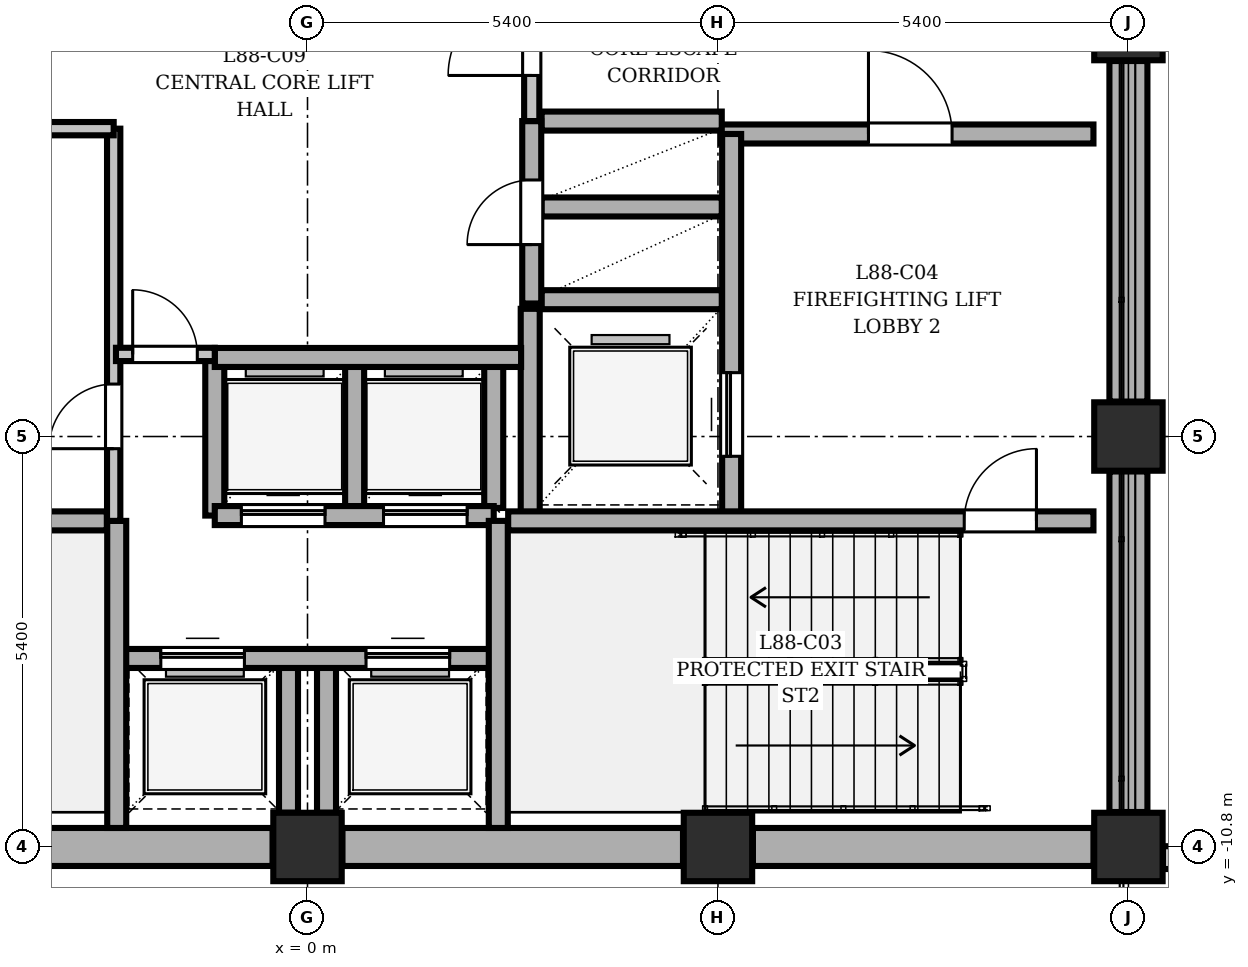
"""IFC4 building model, lengths in metres.
Left out: names, types, materials, properties, quantities, classifications, styles, units other than length and angle.
Written with IfcOpenShell. Run it as: python <this file> out.ifc"""

import sys

from ifc_helpers import new_model, si_unit, direction, frame, frame_2d, origin, origin_2d, place, context, subcontext, project, spatial, rectangle, extrude, element, fill, save


model = new_model("IFC4")
c1 = context("Model", 3, precision=1e-05, world=origin(), true_north=direction((0.0, 1.0)))
c2 = subcontext(c1, "Body", "Model", "MODEL_VIEW")
j1 = project(units=[si_unit("LENGTHUNIT", "METRE"), si_unit("PLANEANGLEUNIT", "RADIAN")], contexts=[c1])
p1 = place(None, origin())
s1 = spatial("IfcSite", under=j1, at=p1, CompositionType="ELEMENT")
p2 = place(p1, origin())
s2 = spatial("IfcBuilding", under=s1, at=p2, CompositionType="ELEMENT")
p3 = place(p2, frame((0.0, 0.0, 337.5)))
s3 = spatial("IfcBuildingStorey", under=s2, at=p3, CompositionType="ELEMENT", Elevation=337.5)
for number, where, z_axis, x_axis in (
    (1, (0.0, -10.8, 0.0), (0.0, 0.0, 1.0), (1.0, 0.0, 0.0)),
    (2, (5.4, -10.8, 0.0), (0.0, 0.0, 1.0), (1.0, 0.0, 0.0)),
    (3, (10.8, -10.8, 0.0), (0.0, 0.0, 1.0), (1.0, 0.0, 0.0)),
    (4, (10.8, -5.4, 0.0), (0.0, 0.0, 1.0), (1.0, 0.0, 0.0)),
    (5, (10.8, 0.0, 0.0), (0.0, 0.0, 1.0), (1.0, 0.0, 0.0)),
):
    element("IfcColumn", number, at=place(p3, frame(where, z_axis=z_axis, x_axis=x_axis)), inside=s3, PredefinedType="COLUMN", context=c2, shape_type="SweptSolid", body=[
        extrude(rectangle(XDim=0.9, YDim=0.9, at=origin_2d()), origin(), (0.0, 0.0, 1.0), 4.5),
    ])
for number, where, z_axis, x_axis in (
    (6, (10.8, -10.34, 0.0), (0.0, 0.0, 1.0), (0.0, 1.0, 0.0)),
    (7, (-4.94, -10.8, 0.0), (0.0, 0.0, 1.0), (1.0, 0.0, 0.0)),
    (8, (10.8, -4.94, 0.0), (0.0, 0.0, 1.0), (0.0, 1.0, 0.0)),
    (9, (0.46, -10.8, 0.0), (0.0, 0.0, 1.0), (1.0, 0.0, 0.0)),
    (10, (5.86, -10.8, 0.0), (0.0, 0.0, 1.0), (1.0, 0.0, 0.0)),
):
    element("IfcWall", number, at=place(p3, frame(where, z_axis=z_axis, x_axis=x_axis)), inside=s3, PredefinedType="SHEAR", context=c2, shape_type="SweptSolid", body=[
        extrude(rectangle(XDim=4.48, YDim=0.5, at=frame_2d((2.24, 0.0))), origin(), (0.0, 0.0, 1.0), 4.5),
    ])
p4 = place(p3, frame((11.254, -10.94, 0.0), z_axis=(0.0, 0.0, 1.0), x_axis=(1.0, 0.0, 0.0)))
e11 = element("IfcWall", 11, at=p4, inside=s3, PredefinedType="STANDARD", context=c2, shape_type="SweptSolid", body=[
    extrude(rectangle(XDim=3.706, YDim=0.3, at=frame_2d((1.853, 0.0))), origin(), (0.0, 0.0, 1.0), 3.507),
])
p5 = place(p4, frame((1.328, 0.0, 0.75)))
e12 = element("IfcOpeningElement", 12, at=p5, cuts=e11, PredefinedType="OPENING", context=c2, shape_type="SweptSolid", body=[
    extrude(rectangle(XDim=1.05, YDim=1.5, at=frame_2d((0.525, 0.75))), frame((0.0, 0.16, 0.0), z_axis=(0.0, -1.0, 0.0), x_axis=(1.0, 0.0, 0.0)), (0.0, 0.0, 1.0), 0.32),
])
p6 = place(p3, frame((2.93, -6.51, 0.0), z_axis=(0.0, 0.0, 1.0), x_axis=(0.0, 1.0, 0.0)))
e13 = element("IfcWall", 13, at=p6, inside=s3, PredefinedType="SHEAR", context=c2, shape_type="SweptSolid", body=[
    extrude(rectangle(XDim=2.79, YDim=0.25, at=frame_2d((1.395, 0.0))), origin(), (0.0, 0.0, 1.0), 4.5),
])
p7 = place(p3, frame((5.44, -1.42, 0.0), z_axis=(0.0, 0.0, 1.0), x_axis=(1.0, 0.0, 0.0)))
e14 = element("IfcWall", 14, at=p7, inside=s3, PredefinedType="SHEAR", context=c2, shape_type="SweptSolid", body=[
    extrude(rectangle(XDim=4.9, YDim=0.25, at=frame_2d((2.45, 0.0))), origin(), (0.0, 0.0, 1.0), 4.5),
])
p8 = place(p7, frame((1.94, 0.0, 0.0)))
e15 = element("IfcOpeningElement", 15, at=p8, cuts=e14, PredefinedType="OPENING", context=c2, shape_type="SweptSolid", body=[
    extrude(rectangle(XDim=1.1, YDim=2.1, at=frame_2d((0.55, 1.05))), frame((0.0, 0.135, 0.0), z_axis=(0.0, -1.0, 0.0), x_axis=(1.0, 0.0, 0.0)), (0.0, 0.0, 1.0), 0.27),
])
p9 = place(p3, frame((3.08, -3.6, 0.0), z_axis=(0.0, 0.0, 1.0), x_axis=(1.0, 0.0, 0.0)))
e16 = element("IfcWall", 16, at=p9, inside=s3, PredefinedType="SHEAR", context=c2, shape_type="SweptSolid", body=[
    extrude(rectangle(XDim=2.37, YDim=0.25, at=frame_2d((1.185, 0.0))), origin(), (0.0, 0.0, 1.0), 4.5),
])
p10 = place(p3, frame((5.58, -6.51, 0.0), z_axis=(0.0, 0.0, 1.0), x_axis=(0.0, 1.0, 0.0)))
e17 = element("IfcWall", 17, at=p10, inside=s3, PredefinedType="SHEAR", context=c2, shape_type="SweptSolid", body=[
    extrude(rectangle(XDim=5.09, YDim=0.25, at=frame_2d((2.545, 0.0))), origin(), (0.0, 0.0, 1.0), 4.5),
])
p11 = place(p10, frame((0.85, 0.0, 0.0)))
e18 = element("IfcOpeningElement", 18, at=p11, cuts=e17, PredefinedType="OPENING", context=c2, shape_type="SweptSolid", body=[
    extrude(rectangle(XDim=1.1, YDim=2.1, at=frame_2d((0.55, 1.05))), frame((0.0, 0.135, 0.0), z_axis=(0.0, -1.0, 0.0), x_axis=(1.0, 0.0, 0.0)), (0.0, 0.0, 1.0), 0.27),
])
for number, where, z_axis, x_axis in (
    (19, (0.62, -6.34, 0.0), (0.0, 0.0, 1.0), (0.0, 1.0, 0.0)),
    (20, (2.45, -6.34, 0.0), (0.0, 0.0, 1.0), (0.0, 1.0, 0.0)),
):
    element("IfcWall", number, at=place(p3, frame(where, z_axis=z_axis, x_axis=x_axis)), inside=s3, PredefinedType="SHEAR", context=c2, shape_type="SweptSolid", body=[
        extrude(rectangle(XDim=1.88, YDim=0.25, at=frame_2d((0.94, 0.0))), origin(), (0.0, 0.0, 1.0), 4.5),
    ])
for number, where, z_axis, x_axis in (
    (21, (-0.25, -10.35, 0.0), (0.0, 0.0, 1.0), (0.0, 1.0, 0.0)),
    (22, (0.25, -10.35, 0.0), (0.0, 0.0, 1.0), (0.0, 1.0, 0.0)),
):
    element("IfcWall", number, at=place(p3, frame(where, z_axis=z_axis, x_axis=x_axis)), inside=s3, PredefinedType="SHEAR", context=c2, shape_type="SweptSolid", body=[
        extrude(rectangle(XDim=1.91, YDim=0.25, at=frame_2d((0.955, 0.0))), origin(), (0.0, 0.0, 1.0), 4.5),
    ])
p12 = place(p3, frame((-1.22, -6.44, 0.0), z_axis=(0.0, 0.0, 1.0), x_axis=(0.0, 1.0, 0.0)))
e23 = element("IfcWall", 23, at=p12, inside=s3, PredefinedType="SHEAR", context=c2, shape_type="SweptSolid", body=[
    extrude(rectangle(XDim=2.08, YDim=0.25, at=frame_2d((1.04, 0.0))), origin(), (0.0, 0.0, 1.0), 4.5),
])
p13 = place(p3, frame((-1.22, -6.44, 0.0), z_axis=(0.0, 0.0, 1.0), x_axis=(1.0, 0.0, 0.0)))
e24 = element("IfcWall", 24, at=p13, inside=s3, PredefinedType="SHEAR", context=c2, shape_type="SweptSolid", body=[
    extrude(rectangle(XDim=3.67, YDim=0.25, at=frame_2d((1.835, 0.0))), origin(), (0.0, 0.0, 1.0), 4.5),
])
p14 = place(p13, frame((0.35, 0.0, 0.0)))
e25 = element("IfcOpeningElement", 25, at=p14, cuts=e24, PredefinedType="OPENING", context=c2, shape_type="SweptSolid", body=[
    extrude(rectangle(XDim=1.1, YDim=2.1, at=frame_2d((0.55, 1.05))), frame((0.0, 0.135, 0.0), z_axis=(0.0, -1.0, 0.0), x_axis=(1.0, 0.0, 0.0)), (0.0, 0.0, 1.0), 0.27),
])
p15 = place(p13, frame((2.22, 0.0, 0.0)))
e26 = element("IfcOpeningElement", 26, at=p15, cuts=e24, PredefinedType="OPENING", context=c2, shape_type="SweptSolid", body=[
    extrude(rectangle(XDim=1.1, YDim=2.1, at=frame_2d((0.55, 1.05))), frame((0.0, 0.135, 0.0), z_axis=(0.0, -1.0, 0.0), x_axis=(1.0, 0.0, 0.0)), (0.0, 0.0, 1.0), 0.27),
])
p16 = place(p3, frame((-2.48, -8.32, 0.0), z_axis=(0.0, 0.0, 1.0), x_axis=(1.0, 0.0, 0.0)))
e27 = element("IfcWall", 27, at=p16, inside=s3, PredefinedType="SHEAR", context=c2, shape_type="SweptSolid", body=[
    extrude(rectangle(XDim=4.93, YDim=0.25, at=frame_2d((2.465, 0.0))), origin(), (0.0, 0.0, 1.0), 4.5),
])
p17 = place(p16, frame((0.55, 0.0, 0.0)))
e28 = element("IfcOpeningElement", 28, at=p17, cuts=e27, PredefinedType="OPENING", context=c2, shape_type="SweptSolid", body=[
    extrude(rectangle(XDim=1.1, YDim=2.1, at=frame_2d((0.55, 1.05))), frame((0.0, 0.135, 0.0), z_axis=(0.0, -1.0, 0.0), x_axis=(1.0, 0.0, 0.0)), (0.0, 0.0, 1.0), 0.27),
])
p18 = place(p16, frame((3.25, 0.0, 0.0)))
e29 = element("IfcOpeningElement", 29, at=p18, cuts=e27, PredefinedType="OPENING", context=c2, shape_type="SweptSolid", body=[
    extrude(rectangle(XDim=1.1, YDim=2.1, at=frame_2d((0.55, 1.05))), frame((0.0, 0.135, 0.0), z_axis=(0.0, -1.0, 0.0), x_axis=(1.0, 0.0, 0.0)), (0.0, 0.0, 1.0), 0.27),
])
p19 = place(p3, frame((-1.22, -4.36, 0.0), z_axis=(0.0, 0.0, 1.0), x_axis=(1.0, 0.0, 0.0)))
e30 = element("IfcWall", 30, at=p19, inside=s3, PredefinedType="SHEAR", context=c2, shape_type="SweptSolid", body=[
    extrude(rectangle(XDim=4.03, YDim=0.25, at=frame_2d((2.015, 0.0))), origin(), (0.0, 0.0, 1.0), 4.5),
])
for number, where, z_axis, x_axis in (
    (31, (3.08, -2.38, 0.0), (0.0, 0.0, 1.0), (1.0, 0.0, 0.0)),
    (32, (3.08, -1.25, 0.0), (0.0, 0.0, 1.0), (1.0, 0.0, 0.0)),
):
    element("IfcWall", number, at=place(p3, frame(where, z_axis=z_axis, x_axis=x_axis)), inside=s3, PredefinedType="SHEAR", context=c2, shape_type="SweptSolid", body=[
        extrude(rectangle(XDim=2.37, YDim=0.25, at=frame_2d((1.185, 0.0))), origin(), (0.0, 0.0, 1.0), 4.5),
    ])
p20 = place(p3, frame((2.95, -3.65, 0.0), z_axis=(0.0, 0.0, 1.0), x_axis=(0.0, 1.0, 0.0)))
e33 = element("IfcWall", 33, at=p20, inside=s3, PredefinedType="SHEAR", context=c2, shape_type="SweptSolid", body=[
    extrude(rectangle(XDim=2.4, YDim=0.25, at=frame_2d((1.2, 0.0))), origin(), (0.0, 0.0, 1.0), 4.5),
])
p21 = place(p20, frame((0.775, 0.0, 0.0)))
e34 = element("IfcOpeningElement", 34, at=p21, cuts=e33, PredefinedType="OPENING", context=c2, shape_type="SweptSolid", body=[
    extrude(rectangle(XDim=0.85, YDim=2.1, at=frame_2d((0.425, 1.05))), frame((0.0, 0.135, 0.0), z_axis=(0.0, -1.0, 0.0), x_axis=(1.0, 0.0, 0.0)), (0.0, 0.0, 1.0), 0.27),
])
p22 = place(p3, frame((2.64, -6.51, 0.0), z_axis=(0.0, 0.0, 1.0), x_axis=(1.0, 0.0, 0.0)))
e35 = element("IfcWall", 35, at=p22, inside=s3, PredefinedType="SHEAR", context=c2, shape_type="SweptSolid", body=[
    extrude(rectangle(XDim=7.7, YDim=0.25, at=frame_2d((3.85, 0.0))), origin(), (0.0, 0.0, 1.0), 4.5),
])
p23 = place(p22, frame((6.0, 0.0, 0.0)))
e36 = element("IfcOpeningElement", 36, at=p23, cuts=e35, PredefinedType="OPENING", context=c2, shape_type="SweptSolid", body=[
    extrude(rectangle(XDim=0.95, YDim=2.1, at=frame_2d((0.475, 1.05))), frame((0.0, 0.135, 0.0), z_axis=(0.0, -1.0, 0.0), x_axis=(1.0, 0.0, 0.0)), (0.0, 0.0, 1.0), 0.27),
])
for number, where, z_axis, x_axis in (
    (37, (2.51, -10.55, 0.0), (0.0, 0.0, 1.0), (0.0, 1.0, 0.0)),
    (38, (-2.51, -10.55, 0.0), (0.0, 0.0, 1.0), (0.0, 1.0, 0.0)),
):
    element("IfcWall", number, at=place(p3, frame(where, z_axis=z_axis, x_axis=x_axis)), inside=s3, PredefinedType="SHEAR", context=c2, shape_type="SweptSolid", body=[
        extrude(rectangle(XDim=4.04, YDim=0.25, at=frame_2d((2.02, 0.0))), origin(), (0.0, 0.0, 1.0), 4.5),
    ])
p24 = place(p3, frame((-10.34, -6.51, 0.0), z_axis=(0.0, 0.0, 1.0), x_axis=(1.0, 0.0, 0.0)))
e39 = element("IfcWall", 39, at=p24, inside=s3, PredefinedType="SHEAR", context=c2, shape_type="SweptSolid", body=[
    extrude(rectangle(XDim=7.7, YDim=0.25, at=frame_2d((3.85, 0.0))), origin(), (0.0, 0.0, 1.0), 4.5),
])
p25 = place(p24, frame((0.35, 0.0, 0.0)))
e40 = element("IfcOpeningElement", 40, at=p25, cuts=e39, PredefinedType="OPENING", context=c2, shape_type="SweptSolid", body=[
    extrude(rectangle(XDim=1.1, YDim=2.1, at=frame_2d((0.55, 1.05))), frame((0.0, 0.135, 0.0), z_axis=(0.0, -1.0, 0.0), x_axis=(1.0, 0.0, 0.0)), (0.0, 0.0, 1.0), 0.27),
])
p26 = place(p3, frame((-2.55, -6.51, 0.0), z_axis=(0.0, 0.0, 1.0), x_axis=(0.0, 1.0, 0.0)))
e41 = element("IfcWall", 41, at=p26, inside=s3, PredefinedType="PARTITIONING", context=c2, shape_type="SweptSolid", body=[
    extrude(rectangle(XDim=5.16, YDim=0.175, at=frame_2d((2.58, 0.0))), origin(), (0.0, 0.0, 1.0), 4.22),
])
p27 = place(p26, frame((0.95, 0.0, 0.0)))
e42 = element("IfcOpeningElement", 42, at=p27, cuts=e41, PredefinedType="OPENING", context=c2, shape_type="SweptSolid", body=[
    extrude(rectangle(XDim=0.85, YDim=2.1, at=frame_2d((0.425, 1.05))), frame((0.0, 0.097, 0.0), z_axis=(0.0, -1.0, 0.0), x_axis=(1.0, 0.0, 0.0)), (0.0, 0.0, 1.0), 0.195),
])
p28 = place(p3, frame((-7.18, -1.35, 0.0), z_axis=(0.0, 0.0, 1.0), x_axis=(1.0, 0.0, 0.0)))
e43 = element("IfcWall", 43, at=p28, inside=s3, PredefinedType="PARTITIONING", context=c2, shape_type="SweptSolid", body=[
    extrude(rectangle(XDim=4.63, YDim=0.175, at=frame_2d((2.315, 0.0))), origin(), (0.0, 0.0, 1.0), 4.22),
])
p29 = place(p3, frame((-2.52, -4.32, 0.0), z_axis=(0.0, 0.0, 1.0), x_axis=(1.0, 0.0, 0.0)))
e44 = element("IfcWall", 44, at=p29, inside=s3, PredefinedType="PARTITIONING", context=c2, shape_type="SweptSolid", body=[
    extrude(rectangle(XDim=1.3, YDim=0.175, at=frame_2d((0.65, 0.0))), origin(), (0.0, 0.0, 1.0), 4.22),
])
p30 = place(p29, frame((0.22, 0.0, 0.0)))
e45 = element("IfcOpeningElement", 45, at=p30, cuts=e44, PredefinedType="OPENING", context=c2, shape_type="SweptSolid", body=[
    extrude(rectangle(XDim=0.85, YDim=2.1, at=frame_2d((0.425, 1.05))), frame((0.0, 0.097, 0.0), z_axis=(0.0, -1.0, 0.0), x_axis=(1.0, 0.0, 0.0)), (0.0, 0.0, 1.0), 0.195),
])
p31 = place(p3, frame((2.95, -1.25, 0.0), z_axis=(0.0, 0.0, 1.0), x_axis=(0.0, 1.0, 0.0)))
e46 = element("IfcWall", 46, at=p31, inside=s3, PredefinedType="PARTITIONING", context=c2, shape_type="SweptSolid", body=[
    extrude(rectangle(XDim=2.77, YDim=0.2, at=frame_2d((1.385, 0.0))), origin(), (0.0, 0.0, 1.0), 4.22),
])
p32 = place(p31, frame((0.6, 0.0, 0.0)))
e47 = element("IfcOpeningElement", 47, at=p32, cuts=e46, PredefinedType="OPENING", context=c2, shape_type="SweptSolid", body=[
    extrude(rectangle(XDim=1.1, YDim=2.1, at=frame_2d((0.55, 1.05))), frame((0.0, 0.11, 0.0), z_axis=(0.0, -1.0, 0.0), x_axis=(1.0, 0.0, 0.0)), (0.0, 0.0, 1.0), 0.22),
])
p33 = place(p23, origin())
e48 = element("IfcDoor", 48, at=p33, inside=s3, OperationType="SINGLE_SWING_RIGHT", PredefinedType="DOOR", context=c2, shape_type="SweptSolid", body=[
    extrude(rectangle(XDim=0.95, YDim=2.1, at=frame_2d((0.475, 1.05))), frame((0.0, 0.025, 0.0), z_axis=(0.0, -1.0, 0.0), x_axis=(1.0, 0.0, 0.0)), (0.0, 0.0, 1.0), 0.05),
])
fill(e36, e48)
p34 = place(p21, origin())
e49 = element("IfcDoor", 49, at=p34, inside=s3, OperationType="SINGLE_SWING_LEFT", PredefinedType="DOOR", context=c2, shape_type="SweptSolid", body=[
    extrude(rectangle(XDim=0.85, YDim=2.1, at=frame_2d((0.425, 1.05))), frame((0.0, 0.025, 0.0), z_axis=(0.0, -1.0, 0.0), x_axis=(1.0, 0.0, 0.0)), (0.0, 0.0, 1.0), 0.05),
])
fill(e34, e49)
p35 = place(p8, origin())
e50 = element("IfcDoor", 50, at=p35, inside=s3, OperationType="SINGLE_SWING_LEFT", PredefinedType="DOOR", context=c2, shape_type="SweptSolid", body=[
    extrude(rectangle(XDim=1.1, YDim=2.1, at=frame_2d((0.55, 1.05))), frame((0.0, 0.025, 0.0), z_axis=(0.0, -1.0, 0.0), x_axis=(1.0, 0.0, 0.0)), (0.0, 0.0, 1.0), 0.05),
])
fill(e15, e50)
p36 = place(p11, origin())
e51 = element("IfcDoor", 51, at=p36, inside=s3, OperationType="SLIDING_TO_RIGHT", PredefinedType="DOOR", context=c2, shape_type="SweptSolid", body=[
    extrude(rectangle(XDim=1.1, YDim=2.1, at=frame_2d((0.55, 1.05))), frame((0.0, 0.025, 0.0), z_axis=(0.0, -1.0, 0.0), x_axis=(1.0, 0.0, 0.0)), (0.0, 0.0, 1.0), 0.05),
])
fill(e18, e51)
p37 = place(p32, origin())
e52 = element("IfcDoor", 52, at=p37, inside=s3, OperationType="SINGLE_SWING_LEFT", PredefinedType="DOOR", context=c2, shape_type="SweptSolid", body=[
    extrude(rectangle(XDim=1.1, YDim=2.1, at=frame_2d((0.55, 1.05))), frame((0.0, 0.025, 0.0), z_axis=(0.0, -1.0, 0.0), x_axis=(1.0, 0.0, 0.0)), (0.0, 0.0, 1.0), 0.05),
])
fill(e47, e52)
p38 = place(p30, origin())
e53 = element("IfcDoor", 53, at=p38, inside=s3, OperationType="SINGLE_SWING_LEFT", PredefinedType="DOOR", context=c2, shape_type="SweptSolid", body=[
    extrude(rectangle(XDim=0.85, YDim=2.1, at=frame_2d((0.425, 1.05))), frame((0.0, 0.025, 0.0), z_axis=(0.0, -1.0, 0.0), x_axis=(1.0, 0.0, 0.0)), (0.0, 0.0, 1.0), 0.05),
])
fill(e45, e53)
p39 = place(p14, origin())
e54 = element("IfcDoor", 54, at=p39, inside=s3, OperationType="SLIDING_TO_LEFT", PredefinedType="DOOR", context=c2, shape_type="SweptSolid", body=[
    extrude(rectangle(XDim=1.1, YDim=2.1, at=frame_2d((0.55, 1.05))), frame((0.0, 0.025, 0.0), z_axis=(0.0, -1.0, 0.0), x_axis=(1.0, 0.0, 0.0)), (0.0, 0.0, 1.0), 0.05),
])
fill(e25, e54)
p40 = place(p15, origin())
e55 = element("IfcDoor", 55, at=p40, inside=s3, OperationType="SLIDING_TO_LEFT", PredefinedType="DOOR", context=c2, shape_type="SweptSolid", body=[
    extrude(rectangle(XDim=1.1, YDim=2.1, at=frame_2d((0.55, 1.05))), frame((0.0, 0.025, 0.0), z_axis=(0.0, -1.0, 0.0), x_axis=(1.0, 0.0, 0.0)), (0.0, 0.0, 1.0), 0.05),
])
fill(e26, e55)
p41 = place(p17, origin())
e56 = element("IfcDoor", 56, at=p41, inside=s3, OperationType="SLIDING_TO_LEFT", PredefinedType="DOOR", context=c2, shape_type="SweptSolid", body=[
    extrude(rectangle(XDim=1.1, YDim=2.1, at=frame_2d((0.55, 1.05))), frame((0.0, 0.025, 0.0), z_axis=(0.0, -1.0, 0.0), x_axis=(1.0, 0.0, 0.0)), (0.0, 0.0, 1.0), 0.05),
])
fill(e28, e56)
p42 = place(p18, origin())
e57 = element("IfcDoor", 57, at=p42, inside=s3, OperationType="SLIDING_TO_LEFT", PredefinedType="DOOR", context=c2, shape_type="SweptSolid", body=[
    extrude(rectangle(XDim=1.1, YDim=2.1, at=frame_2d((0.55, 1.05))), frame((0.0, 0.025, 0.0), z_axis=(0.0, -1.0, 0.0), x_axis=(1.0, 0.0, 0.0)), (0.0, 0.0, 1.0), 0.05),
])
fill(e29, e57)
p43 = place(p27, origin())
e58 = element("IfcDoor", 58, at=p43, inside=s3, OperationType="SINGLE_SWING_LEFT", PredefinedType="DOOR", context=c2, shape_type="SweptSolid", body=[
    extrude(rectangle(XDim=0.85, YDim=2.1, at=frame_2d((0.425, 1.05))), frame((0.0, 0.025, 0.0), z_axis=(0.0, -1.0, 0.0), x_axis=(1.0, 0.0, 0.0)), (0.0, 0.0, 1.0), 0.05),
])
fill(e42, e58)
save(model, sys.argv[1])
